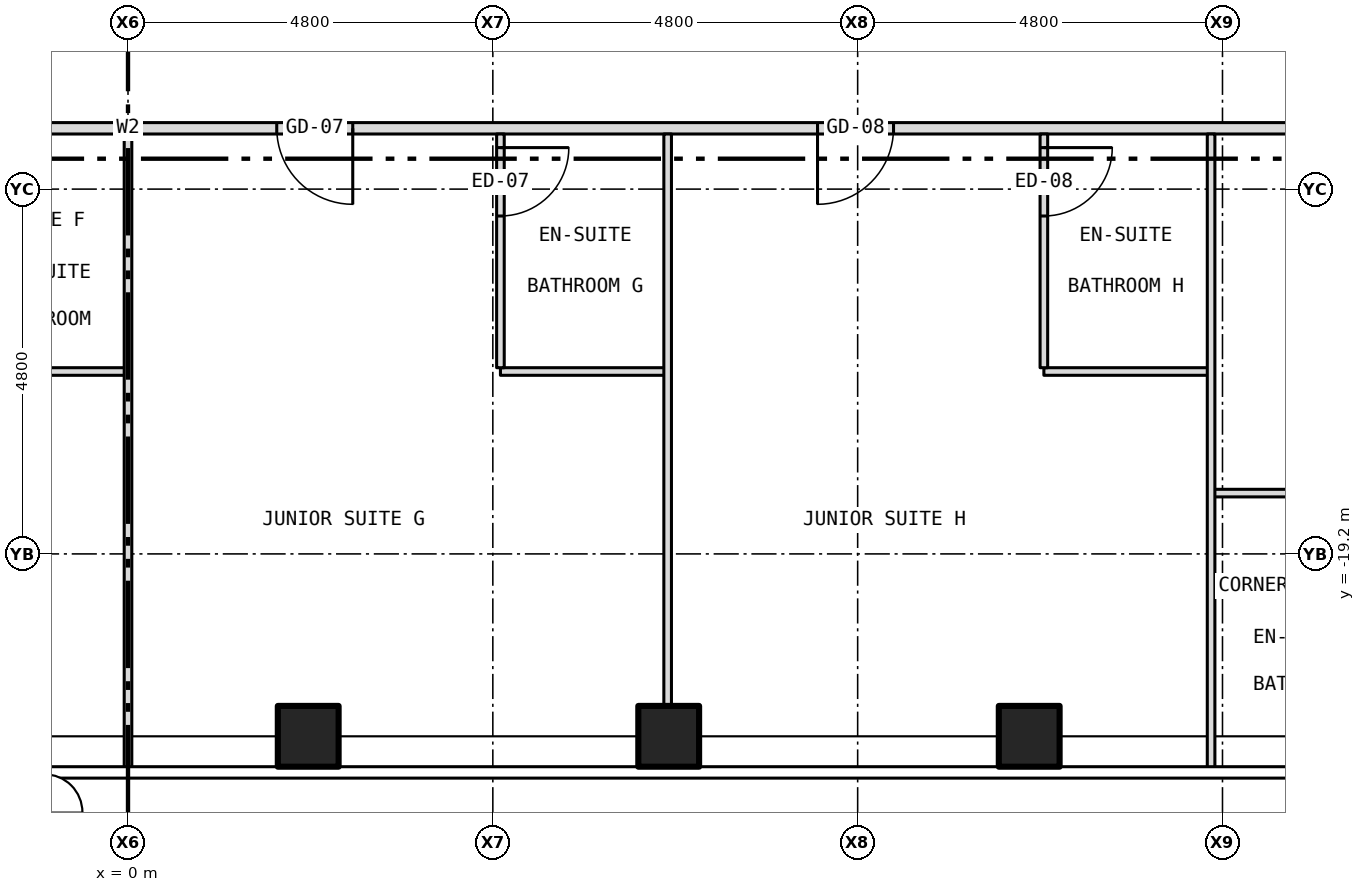
"""IFC4 building model, lengths in metres.
Left out: names, types, materials, properties, quantities, classifications, styles, units other than length and angle.
Written with IfcOpenShell. Run it as: python <this file> out.ifc"""

import sys

from ifc_helpers import new_model, si_unit, direction, frame, frame_2d, origin, origin_2d, place, context, subcontext, project, spatial, rectangle, hollow_rectangle, extrude, element, fill, save


model = new_model("IFC4")
c1 = context("Model", 3, precision=1e-05, world=origin(), true_north=direction((0.0, 1.0)))
c2 = subcontext(c1, "Body", "Model", "MODEL_VIEW")
j1 = project(units=[si_unit("LENGTHUNIT", "METRE"), si_unit("PLANEANGLEUNIT", "RADIAN")], contexts=[c1])
p1 = place(None, origin())
s1 = spatial("IfcSite", under=j1, at=p1, CompositionType="ELEMENT")
p2 = place(p1, origin())
s2 = spatial("IfcBuilding", under=s1, at=p2, CompositionType="ELEMENT")
p3 = place(p2, frame((0.0, 0.0, 172.5)))
s3 = spatial("IfcBuildingStorey", under=s2, at=p3, CompositionType="ELEMENT", Elevation=172.5)
for number, where, z_axis, x_axis in (
    (1, (2.371, -21.6, -0.15), (0.0, 0.0, 1.0), (1.0, 0.0, 0.0)),
    (2, (7.114, -21.6, -0.15), (0.0, 0.0, 1.0), (1.0, 0.0, 0.0)),
    (3, (11.857, -21.6, -0.15), (0.0, 0.0, 1.0), (1.0, 0.0, 0.0)),
):
    element("IfcColumn", number, at=place(p3, frame(where, z_axis=z_axis, x_axis=x_axis)), inside=s3, PredefinedType="COLUMN", context=c2, shape_type="SweptSolid", body=[
        extrude(hollow_rectangle(XDim=0.8, YDim=0.8, WallThickness=0.045, at=origin_2d()), origin(), (0.0, 0.0, 1.0), 3.5),
    ])
p4 = place(p3, frame((14.25, -18.4, 0.0), z_axis=(0.0, 0.0, 1.0), x_axis=(1.0, 0.0, 0.0)))
e4 = element("IfcWall", 4, at=p4, inside=s3, PredefinedType="PARTITIONING", context=c2, shape_type="SweptSolid", body=[
    extrude(rectangle(XDim=2.78, YDim=0.1, at=frame_2d((1.39, 0.0))), origin(), (0.0, 0.0, 1.0), 3.35),
])
p5 = place(p4, frame((1.189, 0.0, 0.0)))
e5 = element("IfcOpeningElement", 5, at=p5, cuts=e4, PredefinedType="OPENING", context=c2, shape_type="SweptSolid", body=[
    extrude(rectangle(XDim=0.9, YDim=2.1, at=frame_2d((0.45, 1.05))), frame((0.0, 0.062, 0.0), z_axis=(0.0, -1.0, 0.0), x_axis=(1.0, 0.0, 0.0)), (0.0, 0.0, 1.0), 0.124),
])
p6 = place(p3, frame((-2.2, -16.8, 0.0), z_axis=(0.0, 0.0, 1.0), x_axis=(1.0, 0.0, 0.0)))
e6 = element("IfcWall", 6, at=p6, inside=s3, PredefinedType="PARTITIONING", context=c2, shape_type="SweptSolid", body=[
    extrude(rectangle(XDim=2.2, YDim=0.1, at=frame_2d((1.1, 0.0))), origin(), (0.0, 0.0, 1.0), 3.35),
])
p7 = place(p3, frame((4.9, -16.8, 0.0), z_axis=(0.0, 0.0, 1.0), x_axis=(1.0, 0.0, 0.0)))
e7 = element("IfcWall", 7, at=p7, inside=s3, PredefinedType="PARTITIONING", context=c2, shape_type="SweptSolid", body=[
    extrude(rectangle(XDim=2.2, YDim=0.1, at=frame_2d((1.1, 0.0))), origin(), (0.0, 0.0, 1.0), 3.35),
])
p8 = place(p3, frame((12.05, -16.8, 0.0), z_axis=(0.0, 0.0, 1.0), x_axis=(1.0, 0.0, 0.0)))
e8 = element("IfcWall", 8, at=p8, inside=s3, PredefinedType="PARTITIONING", context=c2, shape_type="SweptSolid", body=[
    extrude(rectangle(XDim=2.2, YDim=0.1, at=frame_2d((1.1, 0.0))), origin(), (0.0, 0.0, 1.0), 3.35),
])
p9 = place(p3, frame((-15.8, -13.6, 0.0), z_axis=(0.0, 0.0, 1.0), x_axis=(1.0, 0.0, 0.0)))
e9 = element("IfcWall", 9, at=p9, inside=s3, PredefinedType="PARTITIONING", context=c2, shape_type="SweptSolid", body=[
    extrude(rectangle(XDim=31.6, YDim=0.15, at=frame_2d((15.8, 0.0))), origin(), (0.0, 0.0, 1.0), 3.35),
])
p10 = place(p9, frame((4.543, 0.0, 0.0)))
e10 = element("IfcOpeningElement", 10, at=p10, cuts=e9, PredefinedType="OPENING", context=c2, shape_type="SweptSolid", body=[
    extrude(rectangle(XDim=1.0, YDim=2.1, at=frame_2d((0.5, 1.05))), frame((0.0, 0.087, 0.0), z_axis=(0.0, -1.0, 0.0), x_axis=(1.0, 0.0, 0.0)), (0.0, 0.0, 1.0), 0.174),
])
p11 = place(p9, frame((7.949, 0.0, 0.0)))
e11 = element("IfcOpeningElement", 11, at=p11, cuts=e9, PredefinedType="OPENING", context=c2, shape_type="SweptSolid", body=[
    extrude(rectangle(XDim=1.0, YDim=2.1, at=frame_2d((0.5, 1.05))), frame((0.0, 0.087, 0.0), z_axis=(0.0, -1.0, 0.0), x_axis=(1.0, 0.0, 0.0)), (0.0, 0.0, 1.0), 0.174),
])
p12 = place(p9, frame((17.757, 0.0, 0.0)))
e12 = element("IfcOpeningElement", 12, at=p12, cuts=e9, PredefinedType="OPENING", context=c2, shape_type="SweptSolid", body=[
    extrude(rectangle(XDim=1.0, YDim=2.1, at=frame_2d((0.5, 1.05))), frame((0.0, 0.087, 0.0), z_axis=(0.0, -1.0, 0.0), x_axis=(1.0, 0.0, 0.0)), (0.0, 0.0, 1.0), 0.174),
])
p13 = place(p9, frame((24.872, 0.0, 0.0)))
e13 = element("IfcOpeningElement", 13, at=p13, cuts=e9, PredefinedType="OPENING", context=c2, shape_type="SweptSolid", body=[
    extrude(rectangle(XDim=1.0, YDim=2.1, at=frame_2d((0.5, 1.05))), frame((0.0, 0.087, 0.0), z_axis=(0.0, -1.0, 0.0), x_axis=(1.0, 0.0, 0.0)), (0.0, 0.0, 1.0), 0.174),
])
p14 = place(p3, frame((0.0, -22.03, 0.0), z_axis=(0.0, 0.0, 1.0), x_axis=(0.0, 1.0, 0.0)))
e14 = element("IfcWall", 14, at=p14, inside=s3, PredefinedType="PARTITIONING", context=c2, shape_type="SweptSolid", body=[
    extrude(rectangle(XDim=8.355, YDim=0.1, at=frame_2d((4.177, 0.0))), origin(), (0.0, 0.0, 1.0), 2.728),
])
p15 = place(p3, frame((4.9, -16.75, 0.0), z_axis=(0.0, 0.0, 1.0), x_axis=(0.0, 1.0, 0.0)))
e15 = element("IfcWall", 15, at=p15, inside=s3, PredefinedType="PARTITIONING", context=c2, shape_type="SweptSolid", body=[
    extrude(rectangle(XDim=3.075, YDim=0.1, at=frame_2d((1.538, 0.0))), origin(), (0.0, 0.0, 1.0), 2.817),
])
p16 = place(p15, frame((1.996, 0.0, 0.0)))
e16 = element("IfcOpeningElement", 16, at=p16, cuts=e15, PredefinedType="OPENING", context=c2, shape_type="SweptSolid", body=[
    extrude(rectangle(XDim=0.9, YDim=2.1, at=frame_2d((0.45, 1.05))), frame((0.0, 0.062, 0.0), z_axis=(0.0, -1.0, 0.0), x_axis=(1.0, 0.0, 0.0)), (0.0, 0.0, 1.0), 0.124),
])
p17 = place(p3, frame((7.1, -21.48, 0.0), z_axis=(0.0, 0.0, 1.0), x_axis=(0.0, 1.0, 0.0)))
e17 = element("IfcWall", 17, at=p17, inside=s3, PredefinedType="PARTITIONING", context=c2, shape_type="SweptSolid", body=[
    extrude(rectangle(XDim=7.805, YDim=0.1, at=frame_2d((3.902, 0.0))), origin(), (0.0, 0.0, 1.0), 3.35),
])
p18 = place(p3, frame((12.05, -16.75, 0.0), z_axis=(0.0, 0.0, 1.0), x_axis=(0.0, 1.0, 0.0)))
e18 = element("IfcWall", 18, at=p18, inside=s3, PredefinedType="PARTITIONING", context=c2, shape_type="SweptSolid", body=[
    extrude(rectangle(XDim=3.075, YDim=0.1, at=frame_2d((1.538, 0.0))), origin(), (0.0, 0.0, 1.0), 3.35),
])
p19 = place(p18, frame((1.996, 0.0, 0.0)))
e19 = element("IfcOpeningElement", 19, at=p19, cuts=e18, PredefinedType="OPENING", context=c2, shape_type="SweptSolid", body=[
    extrude(rectangle(XDim=0.9, YDim=2.1, at=frame_2d((0.45, 1.05))), frame((0.0, 0.062, 0.0), z_axis=(0.0, -1.0, 0.0), x_axis=(1.0, 0.0, 0.0)), (0.0, 0.0, 1.0), 0.124),
])
p20 = place(p3, frame((14.25, -22.03, 0.0), z_axis=(0.0, 0.0, 1.0), x_axis=(0.0, 1.0, 0.0)))
e20 = element("IfcWall", 20, at=p20, inside=s3, PredefinedType="PARTITIONING", context=c2, shape_type="SweptSolid", body=[
    extrude(rectangle(XDim=8.355, YDim=0.1, at=frame_2d((4.177, 0.0))), origin(), (0.0, 0.0, 1.0), 2.817),
])
p21 = place(p12, origin())
e21 = element("IfcDoor", 21, at=p21, inside=s3, OperationType="SINGLE_SWING_RIGHT", PredefinedType="DOOR", context=c2, shape_type="SweptSolid", body=[
    extrude(rectangle(XDim=1.0, YDim=2.1, at=frame_2d((0.5, 1.05))), frame((0.0, 0.025, 0.0), z_axis=(0.0, -1.0, 0.0), x_axis=(1.0, 0.0, 0.0)), (0.0, 0.0, 1.0), 0.05),
])
fill(e12, e21)
p22 = place(p16, origin())
e22 = element("IfcDoor", 22, at=p22, inside=s3, OperationType="SINGLE_SWING_RIGHT", PredefinedType="DOOR", context=c2, shape_type="SweptSolid", body=[
    extrude(rectangle(XDim=0.9, YDim=2.1, at=frame_2d((0.45, 1.05))), frame((0.0, 0.025, 0.0), z_axis=(0.0, -1.0, 0.0), x_axis=(1.0, 0.0, 0.0)), (0.0, 0.0, 1.0), 0.05),
])
fill(e16, e22)
p23 = place(p13, origin())
e23 = element("IfcDoor", 23, at=p23, inside=s3, OperationType="SINGLE_SWING_LEFT", PredefinedType="DOOR", context=c2, shape_type="SweptSolid", body=[
    extrude(rectangle(XDim=1.0, YDim=2.1, at=frame_2d((0.5, 1.05))), frame((0.0, 0.025, 0.0), z_axis=(0.0, -1.0, 0.0), x_axis=(1.0, 0.0, 0.0)), (0.0, 0.0, 1.0), 0.05),
])
fill(e13, e23)
p24 = place(p19, origin())
e24 = element("IfcDoor", 24, at=p24, inside=s3, OperationType="SINGLE_SWING_RIGHT", PredefinedType="DOOR", context=c2, shape_type="SweptSolid", body=[
    extrude(rectangle(XDim=0.9, YDim=2.1, at=frame_2d((0.45, 1.05))), frame((0.0, 0.025, 0.0), z_axis=(0.0, -1.0, 0.0), x_axis=(1.0, 0.0, 0.0)), (0.0, 0.0, 1.0), 0.05),
])
fill(e19, e24)
save(model, sys.argv[1])
